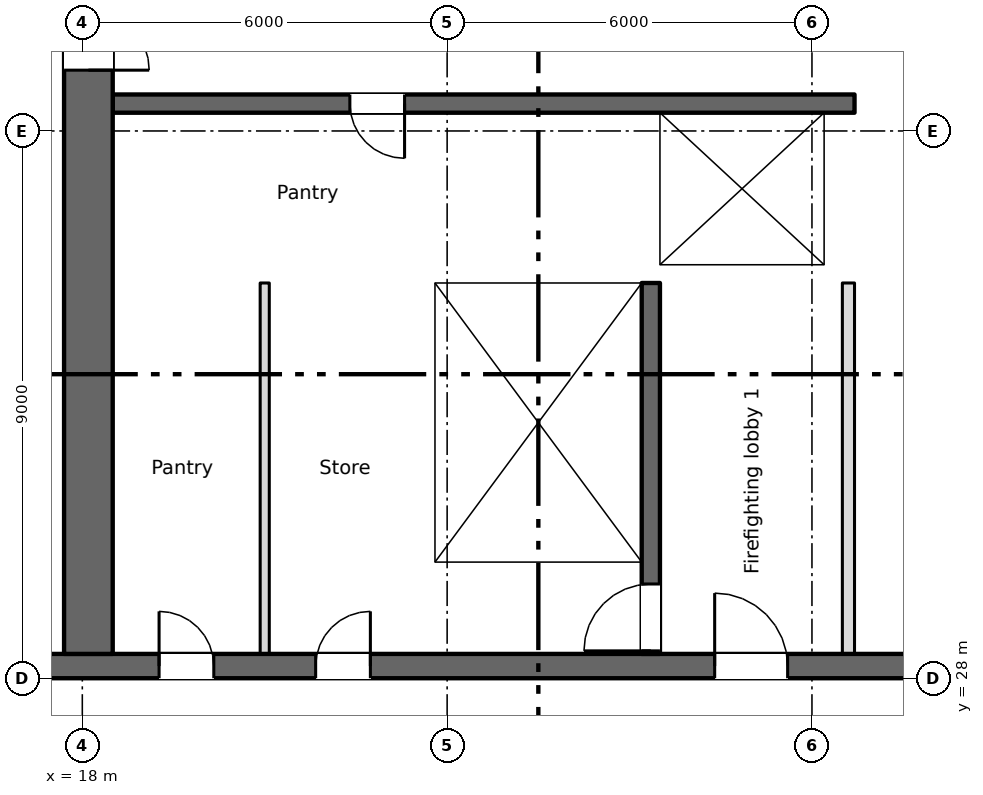
"""IFC4 building model, lengths in metres.
Left out: names, types, materials, properties, quantities, classifications, styles, units other than length and angle.
Written with IfcOpenShell. Run it as: python <this file> out.ifc"""

import sys

from ifc_helpers import new_model, si_unit, direction, frame, frame_2d, origin, place, context, subcontext, project, spatial, rectangle, extrude, element, fill, save


model = new_model("IFC4")
c1 = context("Model", 3, precision=1e-05, world=origin(), true_north=direction((0.0, 1.0)))
c2 = subcontext(c1, "Body", "Model", "MODEL_VIEW")
j1 = project(units=[si_unit("LENGTHUNIT", "METRE"), si_unit("PLANEANGLEUNIT", "RADIAN")], contexts=[c1])
p1 = place(None, origin())
s1 = spatial("IfcSite", under=j1, at=p1, CompositionType="ELEMENT")
p2 = place(p1, origin())
s2 = spatial("IfcBuilding", under=s1, at=p2, CompositionType="ELEMENT")
p3 = place(p2, frame((0.0, 0.0, 110.0)))
s3 = spatial("IfcBuildingStorey", under=s2, at=p3, CompositionType="ELEMENT", Elevation=110.0)
p4 = place(p3, frame((6.7, 28.2, 0.0), z_axis=(0.0, 0.0, 1.0), x_axis=(1.0, 0.0, 0.0)))
e1 = element("IfcWall", 1, at=p4, inside=s3, PredefinedType="SHEAR", context=c2, shape_type="SweptSolid", body=[
    extrude(rectangle(XDim=57.8, YDim=0.4, at=frame_2d((28.9, 0.0))), origin(), (0.0, 0.0, 1.0), 3.35),
])
p5 = place(p4, frame((12.562, 0.0, 0.0)))
e2 = element("IfcOpeningElement", 2, at=p5, cuts=e1, PredefinedType="OPENING", context=c2, shape_type="SweptSolid", body=[
    extrude(rectangle(XDim=0.9, YDim=2.1, at=frame_2d((0.45, 1.05))), frame((0.0, 0.21, 0.0), z_axis=(0.0, -1.0, 0.0), x_axis=(1.0, 0.0, 0.0)), (0.0, 0.0, 1.0), 0.42),
])
p6 = place(p4, frame((15.137, 0.0, 0.0)))
e3 = element("IfcOpeningElement", 3, at=p6, cuts=e1, PredefinedType="OPENING", context=c2, shape_type="SweptSolid", body=[
    extrude(rectangle(XDim=0.9, YDim=2.1, at=frame_2d((0.45, 1.05))), frame((0.0, 0.21, 0.0), z_axis=(0.0, -1.0, 0.0), x_axis=(1.0, 0.0, 0.0)), (0.0, 0.0, 1.0), 0.42),
])
p7 = place(p4, frame((49.85, 0.0, 0.0)))
e4 = element("IfcOpeningElement", 4, at=p7, cuts=e1, PredefinedType="OPENING", context=c2, shape_type="SweptSolid", body=[
    extrude(rectangle(XDim=0.9, YDim=2.1, at=frame_2d((0.45, 1.05))), frame((0.0, 0.21, 0.0), z_axis=(0.0, -1.0, 0.0), x_axis=(1.0, 0.0, 0.0)), (0.0, 0.0, 1.0), 0.42),
])
p8 = place(p4, frame((0.562, 0.0, 0.0)))
e5 = element("IfcOpeningElement", 5, at=p8, cuts=e1, PredefinedType="OPENING", context=c2, shape_type="SweptSolid", body=[
    extrude(rectangle(XDim=0.9, YDim=2.1, at=frame_2d((0.45, 1.05))), frame((0.0, 0.21, 0.0), z_axis=(0.0, -1.0, 0.0), x_axis=(1.0, 0.0, 0.0)), (0.0, 0.0, 1.0), 0.42),
])
p9 = place(p4, frame((2.137, 0.0, 0.0)))
e6 = element("IfcOpeningElement", 6, at=p9, cuts=e1, PredefinedType="OPENING", context=c2, shape_type="SweptSolid", body=[
    extrude(rectangle(XDim=0.9, YDim=2.1, at=frame_2d((0.45, 1.05))), frame((0.0, 0.21, 0.0), z_axis=(0.0, -1.0, 0.0), x_axis=(1.0, 0.0, 0.0)), (0.0, 0.0, 1.0), 0.42),
])
p10 = place(p4, frame((4.7, 0.0, 0.0)))
e7 = element("IfcOpeningElement", 7, at=p10, cuts=e1, PredefinedType="OPENING", context=c2, shape_type="SweptSolid", body=[
    extrude(rectangle(XDim=1.2, YDim=2.1, at=frame_2d((0.6, 1.05))), frame((0.0, 0.21, 0.0), z_axis=(0.0, -1.0, 0.0), x_axis=(1.0, 0.0, 0.0)), (0.0, 0.0, 1.0), 0.42),
])
p11 = place(p4, frame((31.7, 0.0, 0.0)))
e8 = element("IfcOpeningElement", 8, at=p11, cuts=e1, PredefinedType="OPENING", context=c2, shape_type="SweptSolid", body=[
    extrude(rectangle(XDim=1.2, YDim=2.1, at=frame_2d((0.6, 1.05))), frame((0.0, 0.21, 0.0), z_axis=(0.0, -1.0, 0.0), x_axis=(1.0, 0.0, 0.0)), (0.0, 0.0, 1.0), 0.42),
])
p12 = place(p4, frame((55.2, 0.0, 0.0)))
e9 = element("IfcOpeningElement", 9, at=p12, cuts=e1, PredefinedType="OPENING", context=c2, shape_type="SweptSolid", body=[
    extrude(rectangle(XDim=1.2, YDim=2.1, at=frame_2d((0.6, 1.05))), frame((0.0, 0.21, 0.0), z_axis=(0.0, -1.0, 0.0), x_axis=(1.0, 0.0, 0.0)), (0.0, 0.0, 1.0), 0.42),
])
p13 = place(p4, frame((21.7, 0.0, 0.0)))
e10 = element("IfcOpeningElement", 10, at=p13, cuts=e1, PredefinedType="OPENING", context=c2, shape_type="SweptSolid", body=[
    extrude(rectangle(XDim=1.2, YDim=2.1, at=frame_2d((0.6, 1.05))), frame((0.0, 0.21, 0.0), z_axis=(0.0, -1.0, 0.0), x_axis=(1.0, 0.0, 0.0)), (0.0, 0.0, 1.0), 0.42),
])
p14 = place(p4, frame((41.7, 0.0, 0.0)))
e11 = element("IfcOpeningElement", 11, at=p14, cuts=e1, PredefinedType="OPENING", context=c2, shape_type="SweptSolid", body=[
    extrude(rectangle(XDim=1.2, YDim=2.1, at=frame_2d((0.6, 1.05))), frame((0.0, 0.21, 0.0), z_axis=(0.0, -1.0, 0.0), x_axis=(1.0, 0.0, 0.0)), (0.0, 0.0, 1.0), 0.42),
])
p15 = place(p4, frame((24.85, 0.0, 0.0)))
e12 = element("IfcOpeningElement", 12, at=p15, cuts=e1, PredefinedType="OPENING", context=c2, shape_type="SweptSolid", body=[
    extrude(rectangle(XDim=2.4, YDim=2.1, at=frame_2d((1.2, 1.05))), frame((0.0, 0.21, 0.0), z_axis=(0.0, -1.0, 0.0), x_axis=(1.0, 0.0, 0.0)), (0.0, 0.0, 1.0), 0.42),
])
p16 = place(p4, frame((37.35, 0.0, 0.0)))
e13 = element("IfcOpeningElement", 13, at=p16, cuts=e1, PredefinedType="OPENING", context=c2, shape_type="SweptSolid", body=[
    extrude(rectangle(XDim=2.4, YDim=2.1, at=frame_2d((1.2, 1.05))), frame((0.0, 0.21, 0.0), z_axis=(0.0, -1.0, 0.0), x_axis=(1.0, 0.0, 0.0)), (0.0, 0.0, 1.0), 0.42),
])
p17 = place(p4, frame((7.95, 0.0, 0.0)))
e14 = element("IfcOpeningElement", 14, at=p17, cuts=e1, PredefinedType="OPENING", context=c2, shape_type="SweptSolid", body=[
    extrude(rectangle(XDim=2.4, YDim=2.1, at=frame_2d((1.2, 1.05))), frame((0.0, 0.21, 0.0), z_axis=(0.0, -1.0, 0.0), x_axis=(1.0, 0.0, 0.0)), (0.0, 0.0, 1.0), 0.42),
])
p18 = place(p4, frame((28.85, 0.0, 0.0)))
e15 = element("IfcOpeningElement", 15, at=p18, cuts=e1, PredefinedType="OPENING", context=c2, shape_type="SweptSolid", body=[
    extrude(rectangle(XDim=0.9, YDim=2.1, at=frame_2d((0.45, 1.05))), frame((0.0, 0.21, 0.0), z_axis=(0.0, -1.0, 0.0), x_axis=(1.0, 0.0, 0.0)), (0.0, 0.0, 1.0), 0.42),
])
p19 = place(p4, frame((34.85, 0.0, 0.0)))
e16 = element("IfcOpeningElement", 16, at=p19, cuts=e1, PredefinedType="OPENING", context=c2, shape_type="SweptSolid", body=[
    extrude(rectangle(XDim=0.9, YDim=2.1, at=frame_2d((0.45, 1.05))), frame((0.0, 0.21, 0.0), z_axis=(0.0, -1.0, 0.0), x_axis=(1.0, 0.0, 0.0)), (0.0, 0.0, 1.0), 0.42),
])
p20 = place(p3, frame((18.1, 28.4, 0.0), z_axis=(0.0, 0.0, 1.0), x_axis=(0.0, 1.0, 0.0)))
e17 = element("IfcWall", 17, at=p20, inside=s3, PredefinedType="SHEAR", context=c2, shape_type="SweptSolid", body=[
    extrude(rectangle(XDim=16.8, YDim=0.8, at=frame_2d((8.4, 0.0))), origin(), (0.0, 0.0, 1.0), 3.35),
])
p21 = place(p20, frame((9.6, 0.0, 0.0)))
e18 = element("IfcOpeningElement", 18, at=p21, cuts=e17, PredefinedType="OPENING", context=c2, shape_type="SweptSolid", body=[
    extrude(rectangle(XDim=2.0, YDim=2.1, at=frame_2d((1.0, 1.05))), frame((0.0, 0.41, 0.0), z_axis=(0.0, -1.0, 0.0), x_axis=(1.0, 0.0, 0.0)), (0.0, 0.0, 1.0), 0.82),
])
p22 = place(p20, frame((15.35, 0.0, 0.0)))
e19 = element("IfcOpeningElement", 19, at=p22, cuts=e17, PredefinedType="OPENING", context=c2, shape_type="SweptSolid", body=[
    extrude(rectangle(XDim=1.2, YDim=2.1, at=frame_2d((0.6, 1.05))), frame((0.0, 0.41, 0.0), z_axis=(0.0, -1.0, 0.0), x_axis=(1.0, 0.0, 0.0)), (0.0, 0.0, 1.0), 0.82),
])
p23 = place(p3, frame((23.65, 28.4, 0.0), z_axis=(0.0, 0.0, 1.0), x_axis=(0.0, 1.0, 0.0)))
e20 = element("IfcWall", 20, at=p23, inside=s3, PredefinedType="SHEAR", context=c2, shape_type="SweptSolid", body=[
    extrude(rectangle(XDim=6.1, YDim=0.3, at=frame_2d((3.05, 0.0))), origin(), (0.0, 0.0, 1.0), 3.35),
])
p24 = place(p3, frame((27.35, 28.4, 0.0), z_axis=(0.0, 0.0, 1.0), x_axis=(0.0, 1.0, 0.0)))
e21 = element("IfcWall", 21, at=p24, inside=s3, PredefinedType="SHEAR", context=c2, shape_type="SweptSolid", body=[
    extrude(rectangle(XDim=6.1, YDim=0.3, at=frame_2d((3.05, 0.0))), origin(), (0.0, 0.0, 1.0), 3.35),
])
p25 = place(p24, frame((0.05, 0.0, 0.0)))
e22 = element("IfcOpeningElement", 22, at=p25, cuts=e21, PredefinedType="OPENING", context=c2, shape_type="SweptSolid", body=[
    extrude(rectangle(XDim=1.1, YDim=2.1, at=frame_2d((0.55, 1.05))), frame((0.0, 0.16, 0.0), z_axis=(0.0, -1.0, 0.0), x_axis=(1.0, 0.0, 0.0)), (0.0, 0.0, 1.0), 0.32),
])
p26 = place(p3, frame((18.5, 34.65, 0.0), z_axis=(0.0, 0.0, 1.0), x_axis=(1.0, 0.0, 0.0)))
e23 = element("IfcWall", 23, at=p26, inside=s3, PredefinedType="SHEAR", context=c2, shape_type="SweptSolid", body=[
    extrude(rectangle(XDim=12.2, YDim=0.3, at=frame_2d((6.1, 0.0))), origin(), (0.0, 0.0, 1.0), 3.35),
])
p27 = place(p26, frame((9.8, 0.0, 0.0)))
e24 = element("IfcOpeningElement", 24, at=p27, cuts=e23, PredefinedType="OPENING", context=c2, shape_type="SweptSolid", body=[
    extrude(rectangle(XDim=1.1, YDim=2.1, at=frame_2d((0.55, 1.05))), frame((0.0, 0.16, 0.0), z_axis=(0.0, -1.0, 0.0), x_axis=(1.0, 0.0, 0.0)), (0.0, 0.0, 1.0), 0.32),
])
p28 = place(p3, frame((30.7, 37.45, 0.0), z_axis=(0.0, 0.0, 1.0), x_axis=(-1.0, 0.0, 0.0)))
e25 = element("IfcWall", 25, at=p28, inside=s3, PredefinedType="SHEAR", context=c2, shape_type="SweptSolid", body=[
    extrude(rectangle(XDim=12.2, YDim=0.3, at=frame_2d((6.1, 0.0))), origin(), (0.0, 0.0, 1.0), 3.35),
])
p29 = place(p28, frame((7.4, 0.0, 0.0)))
e26 = element("IfcOpeningElement", 26, at=p29, cuts=e25, PredefinedType="OPENING", context=c2, shape_type="SweptSolid", body=[
    extrude(rectangle(XDim=0.9, YDim=2.1, at=frame_2d((0.45, 1.05))), frame((0.0, 0.16, 0.0), z_axis=(0.0, -1.0, 0.0), x_axis=(1.0, 0.0, 0.0)), (0.0, 0.0, 1.0), 0.32),
])
p30 = place(p3, frame((27.35, 34.8, 0.0), z_axis=(0.0, 0.0, 1.0), x_axis=(0.0, 1.0, 0.0)))
e27 = element("IfcWall", 27, at=p30, inside=s3, PredefinedType="SHEAR", context=c2, shape_type="SweptSolid", body=[
    extrude(rectangle(XDim=2.5, YDim=0.3, at=frame_2d((1.25, 0.0))), origin(), (0.0, 0.0, 1.0), 3.35),
])
p31 = place(p3, frame((30.45, 34.8, 0.0), z_axis=(0.0, 0.0, 1.0), x_axis=(0.0, 1.0, 0.0)))
e28 = element("IfcWall", 28, at=p31, inside=s3, PredefinedType="SHEAR", context=c2, shape_type="SweptSolid", body=[
    extrude(rectangle(XDim=2.5, YDim=0.5, at=frame_2d((1.25, 0.0))), origin(), (0.0, 0.0, 1.0), 3.35),
])
p32 = place(p3, frame((30.6, 28.4, 0.0), z_axis=(0.0, 0.0, 1.0), x_axis=(0.0, 1.0, 0.0)))
e29 = element("IfcWall", 29, at=p32, inside=s3, PredefinedType="PARTITIONING", context=c2, shape_type="SweptSolid", body=[
    extrude(rectangle(XDim=6.1, YDim=0.2, at=frame_2d((3.05, 0.0))), origin(), (0.0, 0.0, 1.0), 3.35),
])
p33 = place(p3, frame((21.0, 28.4, 0.0), z_axis=(0.0, 0.0, 1.0), x_axis=(0.0, 1.0, 0.0)))
e30 = element("IfcWall", 30, at=p33, inside=s3, PredefinedType="PARTITIONING", context=c2, shape_type="SweptSolid", body=[
    extrude(rectangle(XDim=6.1, YDim=0.15, at=frame_2d((3.05, 0.0))), origin(), (0.0, 0.0, 1.0), 3.35),
])
p34 = place(p5, origin())
e31 = element("IfcDoor", 31, at=p34, inside=s3, OperationType="SINGLE_SWING_LEFT", PredefinedType="DOOR", context=c2, shape_type="SweptSolid", body=[
    extrude(rectangle(XDim=0.9, YDim=2.1, at=frame_2d((0.45, 1.05))), frame((0.0, 0.025, 0.0), z_axis=(0.0, -1.0, 0.0), x_axis=(1.0, 0.0, 0.0)), (0.0, 0.0, 1.0), 0.05),
])
fill(e2, e31)
p35 = place(p6, origin())
e32 = element("IfcDoor", 32, at=p35, inside=s3, OperationType="SINGLE_SWING_RIGHT", PredefinedType="DOOR", context=c2, shape_type="SweptSolid", body=[
    extrude(rectangle(XDim=0.9, YDim=2.1, at=frame_2d((0.45, 1.05))), frame((0.0, 0.025, 0.0), z_axis=(0.0, -1.0, 0.0), x_axis=(1.0, 0.0, 0.0)), (0.0, 0.0, 1.0), 0.05),
])
fill(e3, e32)
p36 = place(p29, origin())
e33 = element("IfcDoor", 33, at=p36, inside=s3, OperationType="SINGLE_SWING_LEFT", PredefinedType="DOOR", context=c2, shape_type="SweptSolid", body=[
    extrude(rectangle(XDim=0.9, YDim=2.1, at=frame_2d((0.45, 1.05))), frame((0.0, 0.025, 0.0), z_axis=(0.0, -1.0, 0.0), x_axis=(1.0, 0.0, 0.0)), (0.0, 0.0, 1.0), 0.05),
])
fill(e26, e33)
p37 = place(p27, origin())
e34 = element("IfcDoor", 34, at=p37, inside=s3, OperationType="SLIDING_TO_LEFT", PredefinedType="DOOR", context=c2, shape_type="SweptSolid", body=[
    extrude(rectangle(XDim=1.1, YDim=2.1, at=frame_2d((0.55, 1.05))), frame((0.0, 0.025, 0.0), z_axis=(0.0, -1.0, 0.0), x_axis=(1.0, 0.0, 0.0)), (0.0, 0.0, 1.0), 0.05),
])
fill(e24, e34)
p38 = place(p25, origin())
e35 = element("IfcDoor", 35, at=p38, inside=s3, OperationType="SINGLE_SWING_LEFT", PredefinedType="DOOR", context=c2, shape_type="SweptSolid", body=[
    extrude(rectangle(XDim=1.1, YDim=2.1, at=frame_2d((0.55, 1.05))), frame((0.0, 0.025, 0.0), z_axis=(0.0, -1.0, 0.0), x_axis=(1.0, 0.0, 0.0)), (0.0, 0.0, 1.0), 0.05),
])
fill(e22, e35)
p39 = place(p13, origin())
e36 = element("IfcDoor", 36, at=p39, inside=s3, OperationType="SINGLE_SWING_LEFT", PredefinedType="DOOR", context=c2, shape_type="SweptSolid", body=[
    extrude(rectangle(XDim=1.2, YDim=2.1, at=frame_2d((0.6, 1.05))), frame((0.0, 0.025, 0.0), z_axis=(0.0, -1.0, 0.0), x_axis=(1.0, 0.0, 0.0)), (0.0, 0.0, 1.0), 0.05),
])
fill(e10, e36)
p40 = place(p21, origin())
e37 = element("IfcDoor", 37, at=p40, inside=s3, OperationType="DOUBLE_DOOR_SINGLE_SWING", PredefinedType="DOOR", context=c2, shape_type="SweptSolid", body=[
    extrude(rectangle(XDim=2.0, YDim=2.1, at=frame_2d((1.0, 1.05))), frame((0.0, 0.025, 0.0), z_axis=(0.0, -1.0, 0.0), x_axis=(1.0, 0.0, 0.0)), (0.0, 0.0, 1.0), 0.05),
])
fill(e18, e37)
save(model, sys.argv[1])
